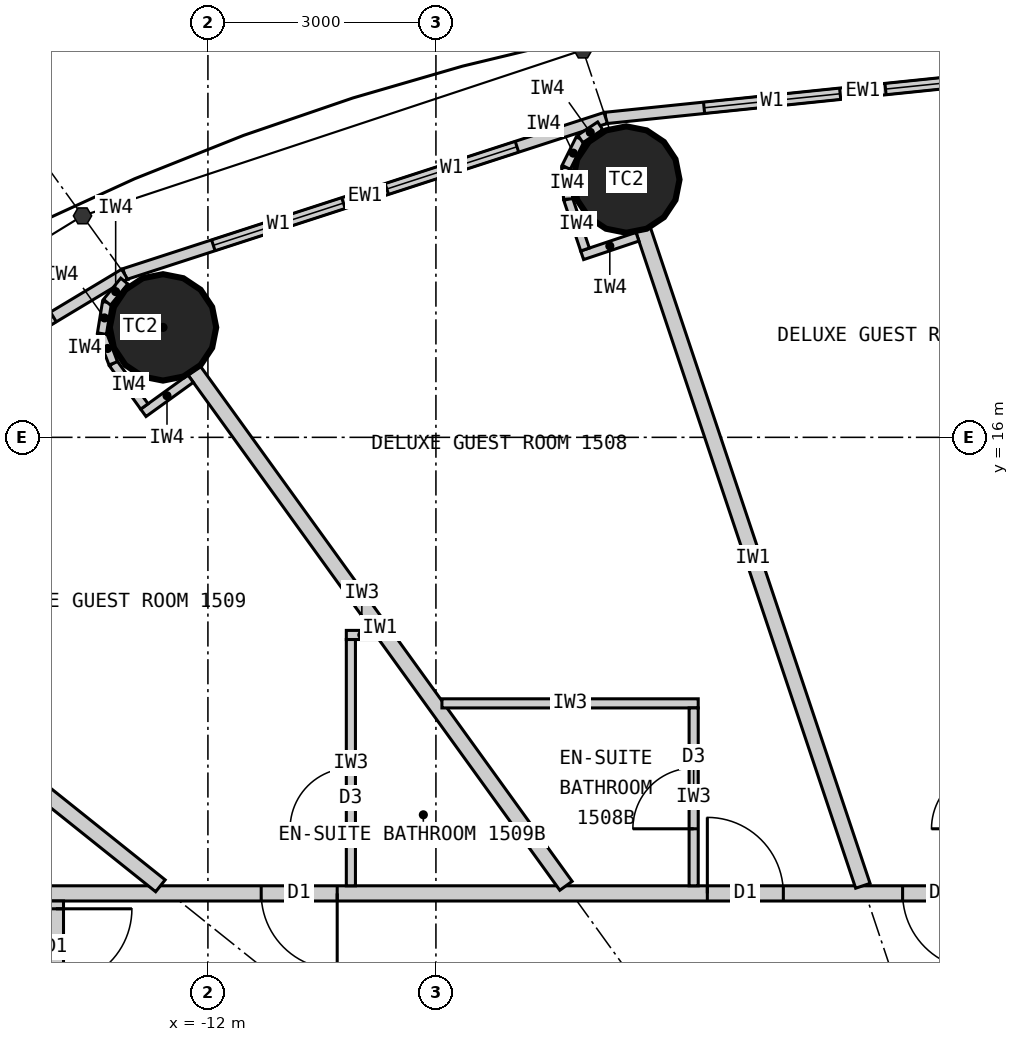
"""IFC4 building model, lengths in metres.
Left out: names, types, materials, properties, quantities, classifications, styles, units other than length and angle.
Written with IfcOpenShell. Run it as: python <this file> out.ifc"""

import sys

from ifc_helpers import new_model, si_unit, direction, frame, frame_2d, origin, origin_2d, place, context, subcontext, project, spatial, rectangle, circle, extrude, element, fill, save


model = new_model("IFC4")
c1 = context("Model", 3, precision=1e-05, world=origin(), true_north=direction((0.0, 1.0)))
c2 = subcontext(c1, "Body", "Model", "MODEL_VIEW")
j1 = project(units=[si_unit("LENGTHUNIT", "METRE"), si_unit("PLANEANGLEUNIT", "RADIAN")], contexts=[c1])
p1 = place(None, origin())
s1 = spatial("IfcSite", under=j1, at=p1, CompositionType="ELEMENT")
p2 = place(p1, origin())
s2 = spatial("IfcBuilding", under=s1, at=p2, CompositionType="ELEMENT")
p3 = place(p2, frame((0.0, 0.0, 63.9)))
s3 = spatial("IfcBuildingStorey", under=s2, at=p3, CompositionType="ELEMENT", Elevation=63.9)
for number, where, z_axis, x_axis in (
    (1, (-6.495, 19.391, 0.0), (0.0, 0.0, 1.0), (1.0, 0.0, 0.0)),
    (2, (-12.591, 17.447, 0.0), (0.0, 0.0, 1.0), (1.0, 0.0, 0.0)),
):
    element("IfcColumn", number, at=place(p3, frame(where, z_axis=z_axis, x_axis=x_axis)), inside=s3, PredefinedType="COLUMN", context=c2, shape_type="SweptSolid", body=[
        extrude(circle(Radius=0.7, at=origin_2d()), origin(), (0.0, 0.0, 1.0), 3.3),
    ])
p4 = place(p3, frame((0.0, 20.9, 0.0), z_axis=(0.0, 0.0, 1.0), x_axis=(-0.994721394369, -0.102612609291, 0.0)))
e3 = element("IfcWall", 3, at=p4, inside=s3, PredefinedType="ELEMENTEDWALL", context=c2, shape_type="SweptSolid", body=[
    extrude(rectangle(XDim=6.802, YDim=0.15, at=frame_2d((3.401, 0.0))), origin(), (0.0, 0.0, 1.0), 3.12),
])
p5 = place(p4, frame((1.301, 0.0, 0.9)))
e4 = element("IfcOpeningElement", 4, at=p5, cuts=e3, PredefinedType="OPENING", context=c2, shape_type="SweptSolid", body=[
    extrude(rectangle(XDim=1.8, YDim=1.9, at=frame_2d((0.9, 0.95))), frame((0.0, 0.085, 0.0), z_axis=(0.0, -1.0, 0.0), x_axis=(1.0, 0.0, 0.0)), (0.0, 0.0, 1.0), 0.17),
])
p6 = place(p4, frame((3.701, 0.0, 0.9)))
e5 = element("IfcOpeningElement", 5, at=p6, cuts=e3, PredefinedType="OPENING", context=c2, shape_type="SweptSolid", body=[
    extrude(rectangle(XDim=1.8, YDim=1.9, at=frame_2d((0.9, 0.95))), frame((0.0, 0.085, 0.0), z_axis=(0.0, -1.0, 0.0), x_axis=(1.0, 0.0, 0.0)), (0.0, 0.0, 1.0), 0.17),
])
p7 = place(p3, frame((-6.766, 20.202, 0.0), z_axis=(0.0, 0.0, 1.0), x_axis=(-0.951137534625, -0.308767534285, 0.0)))
e6 = element("IfcWall", 6, at=p7, inside=s3, PredefinedType="ELEMENTEDWALL", context=c2, shape_type="SweptSolid", body=[
    extrude(rectangle(XDim=6.655, YDim=0.15, at=frame_2d((3.328, 0.0))), origin(), (0.0, 0.0, 1.0), 3.12),
])
p8 = place(p7, frame((1.228, 0.0, 0.9)))
e7 = element("IfcOpeningElement", 7, at=p8, cuts=e6, PredefinedType="OPENING", context=c2, shape_type="SweptSolid", body=[
    extrude(rectangle(XDim=1.8, YDim=1.9, at=frame_2d((0.9, 0.95))), frame((0.0, 0.085, 0.0), z_axis=(0.0, -1.0, 0.0), x_axis=(1.0, 0.0, 0.0)), (0.0, 0.0, 1.0), 0.17),
])
p9 = place(p7, frame((3.628, 0.0, 0.9)))
e8 = element("IfcOpeningElement", 8, at=p9, cuts=e6, PredefinedType="OPENING", context=c2, shape_type="SweptSolid", body=[
    extrude(rectangle(XDim=1.8, YDim=1.9, at=frame_2d((0.9, 0.95))), frame((0.0, 0.085, 0.0), z_axis=(0.0, -1.0, 0.0), x_axis=(1.0, 0.0, 0.0)), (0.0, 0.0, 1.0), 0.17),
])
p10 = place(p3, frame((-13.096, 18.147, 0.0), z_axis=(0.0, 0.0, 1.0), x_axis=(-0.856983180864, -0.515344377787, 0.0)))
e9 = element("IfcWall", 9, at=p10, inside=s3, PredefinedType="ELEMENTEDWALL", context=c2, shape_type="SweptSolid", body=[
    extrude(rectangle(XDim=6.386, YDim=0.15, at=frame_2d((3.193, 0.0))), origin(), (0.0, 0.0, 1.0), 3.12),
])
p11 = place(p10, frame((1.093, 0.0, 0.9)))
e10 = element("IfcOpeningElement", 10, at=p11, cuts=e9, PredefinedType="OPENING", context=c2, shape_type="SweptSolid", body=[
    extrude(rectangle(XDim=1.8, YDim=1.9, at=frame_2d((0.9, 0.95))), frame((0.0, 0.085, 0.0), z_axis=(0.0, -1.0, 0.0), x_axis=(1.0, 0.0, 0.0)), (0.0, 0.0, 1.0), 0.17),
])
p12 = place(p10, frame((3.493, 0.0, 0.9)))
e11 = element("IfcOpeningElement", 11, at=p12, cuts=e9, PredefinedType="OPENING", context=c2, shape_type="SweptSolid", body=[
    extrude(rectangle(XDim=1.8, YDim=1.9, at=frame_2d((0.9, 0.95))), frame((0.0, 0.085, 0.0), z_axis=(0.0, -1.0, 0.0), x_axis=(1.0, 0.0, 0.0)), (0.0, 0.0, 1.0), 0.17),
])
p13 = place(p3, frame((-14.1, 10.0, 0.0), z_axis=(0.0, 0.0, 1.0), x_axis=(1.0, 0.0, 0.0)))
e12 = element("IfcWall", 12, at=p13, inside=s3, PredefinedType="PARTITIONING", context=c2, shape_type="SweptSolid", body=[
    extrude(rectangle(XDim=28.2, YDim=0.2, at=frame_2d((14.1, 0.0))), origin(), (0.0, 0.0, 1.0), 3.12),
])
p14 = place(p13, frame((18.529, 0.0, 0.0)))
e13 = element("IfcOpeningElement", 13, at=p14, cuts=e12, PredefinedType="OPENING", context=c2, shape_type="SweptSolid", body=[
    extrude(rectangle(XDim=1.0, YDim=2.2, at=frame_2d((0.5, 1.1))), frame((0.0, 0.11, 0.0), z_axis=(0.0, -1.0, 0.0), x_axis=(1.0, 0.0, 0.0)), (0.0, 0.0, 1.0), 0.22),
])
p15 = place(p13, frame((14.623, 0.0, 0.0)))
e14 = element("IfcOpeningElement", 14, at=p15, cuts=e12, PredefinedType="OPENING", context=c2, shape_type="SweptSolid", body=[
    extrude(rectangle(XDim=1.0, YDim=2.2, at=frame_2d((0.5, 1.1))), frame((0.0, 0.11, 0.0), z_axis=(0.0, -1.0, 0.0), x_axis=(1.0, 0.0, 0.0)), (0.0, 0.0, 1.0), 0.22),
])
p16 = place(p13, frame((11.24, 0.0, 0.0)))
e15 = element("IfcOpeningElement", 15, at=p16, cuts=e12, PredefinedType="OPENING", context=c2, shape_type="SweptSolid", body=[
    extrude(rectangle(XDim=1.0, YDim=2.2, at=frame_2d((0.5, 1.1))), frame((0.0, 0.11, 0.0), z_axis=(0.0, -1.0, 0.0), x_axis=(1.0, 0.0, 0.0)), (0.0, 0.0, 1.0), 0.22),
])
p17 = place(p13, frame((8.671, 0.0, 0.0)))
e16 = element("IfcOpeningElement", 16, at=p17, cuts=e12, PredefinedType="OPENING", context=c2, shape_type="SweptSolid", body=[
    extrude(rectangle(XDim=1.0, YDim=2.2, at=frame_2d((0.5, 1.1))), frame((0.0, 0.11, 0.0), z_axis=(0.0, -1.0, 0.0), x_axis=(1.0, 0.0, 0.0)), (0.0, 0.0, 1.0), 0.22),
])
p18 = place(p13, frame((2.801, 0.0, 0.0)))
e17 = element("IfcOpeningElement", 17, at=p18, cuts=e12, PredefinedType="OPENING", context=c2, shape_type="SweptSolid", body=[
    extrude(rectangle(XDim=1.0, YDim=2.2, at=frame_2d((0.5, 1.1))), frame((0.0, 0.11, 0.0), z_axis=(0.0, -1.0, 0.0), x_axis=(1.0, 0.0, 0.0)), (0.0, 0.0, 1.0), 0.22),
])
p19 = place(p3, frame((-14.0, 9.9, 0.0), z_axis=(0.0, 0.0, 1.0), x_axis=(0.0, -1.0, 0.0)))
e18 = element("IfcWall", 18, at=p19, inside=s3, PredefinedType="PARTITIONING", context=c2, shape_type="SweptSolid", body=[
    extrude(rectangle(XDim=19.8, YDim=0.2, at=frame_2d((9.9, 0.0))), origin(), (0.0, 0.0, 1.0), 3.12),
])
p20 = place(p19, frame((0.103, 0.0, 0.0)))
e19 = element("IfcOpeningElement", 19, at=p20, cuts=e18, PredefinedType="OPENING", context=c2, shape_type="SweptSolid", body=[
    extrude(rectangle(XDim=1.0, YDim=2.2, at=frame_2d((0.5, 1.1))), frame((0.0, 0.11, 0.0), z_axis=(0.0, -1.0, 0.0), x_axis=(1.0, 0.0, 0.0)), (0.0, 0.0, 1.0), 0.22),
])
p21 = place(p19, frame((5.248, 0.0, 0.0)))
e20 = element("IfcOpeningElement", 20, at=p21, cuts=e18, PredefinedType="OPENING", context=c2, shape_type="SweptSolid", body=[
    extrude(rectangle(XDim=1.0, YDim=2.2, at=frame_2d((0.5, 1.1))), frame((0.0, 0.11, 0.0), z_axis=(0.0, -1.0, 0.0), x_axis=(1.0, 0.0, 0.0)), (0.0, 0.0, 1.0), 0.22),
])
p22 = place(p19, frame((9.438, 0.0, 0.0)))
e21 = element("IfcOpeningElement", 21, at=p22, cuts=e18, PredefinedType="OPENING", context=c2, shape_type="SweptSolid", body=[
    extrude(rectangle(XDim=1.0, YDim=2.2, at=frame_2d((0.5, 1.1))), frame((0.0, 0.11, 0.0), z_axis=(0.0, -1.0, 0.0), x_axis=(1.0, 0.0, 0.0)), (0.0, 0.0, 1.0), 0.22),
])
p23 = place(p19, frame((13.942, 0.0, 0.0)))
e22 = element("IfcOpeningElement", 22, at=p23, cuts=e18, PredefinedType="OPENING", context=c2, shape_type="SweptSolid", body=[
    extrude(rectangle(XDim=1.0, YDim=2.2, at=frame_2d((0.5, 1.1))), frame((0.0, 0.11, 0.0), z_axis=(0.0, -1.0, 0.0), x_axis=(1.0, 0.0, 0.0)), (0.0, 0.0, 1.0), 0.22),
])
p24 = place(p19, frame((18.698, 0.0, 0.0)))
e23 = element("IfcOpeningElement", 23, at=p24, cuts=e18, PredefinedType="OPENING", context=c2, shape_type="SweptSolid", body=[
    extrude(rectangle(XDim=1.0, YDim=2.2, at=frame_2d((0.5, 1.1))), frame((0.0, 0.11, 0.0), z_axis=(0.0, -1.0, 0.0), x_axis=(1.0, 0.0, 0.0)), (0.0, 0.0, 1.0), 0.22),
])
p25 = place(p3, frame((-3.383, 10.1, 0.0), z_axis=(0.0, 0.0, 1.0), x_axis=(-0.31759592231, 0.948226149256, 0.0)))
e24 = element("IfcWall", 24, at=p25, inside=s3, PredefinedType="PARTITIONING", context=c2, shape_type="SweptSolid", body=[
    extrude(rectangle(XDim=9.098, YDim=0.2, at=frame_2d((4.549, 0.0))), origin(), (0.0, 0.0, 1.0), 2.32),
])
p26 = place(p3, frame((-7.289, 10.1, 0.0), z_axis=(0.0, 0.0, 1.0), x_axis=(-0.585198353053, 0.810890182197, 0.0)))
e25 = element("IfcWall", 25, at=p26, inside=s3, PredefinedType="PARTITIONING", context=c2, shape_type="SweptSolid", body=[
    extrude(rectangle(XDim=8.36, YDim=0.2, at=frame_2d((4.18, 0.0))), origin(), (0.0, 0.0, 1.0), 2.32),
])
p27 = place(p3, frame((-12.625, 10.1, 0.0), z_axis=(0.0, 0.0, 1.0), x_axis=(-0.780892451574, 0.624665493744, 0.0)))
e26 = element("IfcWall", 26, at=p27, inside=s3, PredefinedType="PARTITIONING", context=c2, shape_type="SweptSolid", body=[
    extrude(rectangle(XDim=6.045, YDim=0.2, at=frame_2d((3.022, 0.0))), origin(), (0.0, 0.0, 1.0), 2.32),
])
p28 = place(p3, frame((-8.921, 12.5, 0.0), z_axis=(0.0, 0.0, 1.0), x_axis=(1.0, 0.0, 0.0)))
e27 = element("IfcWall", 27, at=p28, inside=s3, PredefinedType="PARTITIONING", context=c2, shape_type="SweptSolid", body=[
    extrude(rectangle(XDim=3.372, YDim=0.12, at=frame_2d((1.686, 0.0))), origin(), (0.0, 0.0, 1.0), 3.12),
])
p29 = place(p3, frame((-5.609, 10.1, 0.0), z_axis=(0.0, 0.0, 1.0), x_axis=(0.0, 1.0, 0.0)))
e28 = element("IfcWall", 28, at=p29, inside=s3, PredefinedType="PARTITIONING", context=c2, shape_type="SweptSolid", body=[
    extrude(rectangle(XDim=2.34, YDim=0.12, at=frame_2d((1.17, 0.0))), origin(), (0.0, 0.0, 1.0), 3.12),
])
p30 = place(p29, frame((0.75, 0.0, 0.0)))
e29 = element("IfcOpeningElement", 29, at=p30, cuts=e28, PredefinedType="OPENING", context=c2, shape_type="SweptSolid", body=[
    extrude(rectangle(XDim=0.8, YDim=2.1, at=frame_2d((0.4, 1.05))), frame((0.0, 0.07, 0.0), z_axis=(0.0, -1.0, 0.0), x_axis=(1.0, 0.0, 0.0)), (0.0, 0.0, 1.0), 0.14),
])
p31 = place(p3, frame((-9.771, 13.4, 0.0), z_axis=(0.0, 0.0, 1.0), x_axis=(-1.0, 0.0, 0.0)))
e30 = element("IfcWall", 30, at=p31, inside=s3, PredefinedType="PARTITIONING", context=c2, shape_type="SweptSolid", body=[
    extrude(rectangle(XDim=0.408, YDim=0.12, at=frame_2d((0.204, 0.0))), origin(), (0.0, 0.0, 1.0), 3.12),
])
p32 = place(p3, frame((-10.119, 10.1, 0.0), z_axis=(0.0, 0.0, 1.0), x_axis=(0.0, 1.0, 0.0)))
e31 = element("IfcWall", 31, at=p32, inside=s3, PredefinedType="PARTITIONING", context=c2, shape_type="SweptSolid", body=[
    extrude(rectangle(XDim=3.24, YDim=0.12, at=frame_2d((1.62, 0.0))), origin(), (0.0, 0.0, 1.0), 3.12),
])
p33 = place(p32, frame((0.75, 0.0, 0.0)))
e32 = element("IfcOpeningElement", 32, at=p33, cuts=e31, PredefinedType="OPENING", context=c2, shape_type="SweptSolid", body=[
    extrude(rectangle(XDim=0.8, YDim=2.1, at=frame_2d((0.4, 1.05))), frame((0.0, 0.07, 0.0), z_axis=(0.0, -1.0, 0.0), x_axis=(1.0, 0.0, 0.0)), (0.0, 0.0, 1.0), 0.14),
])
p34 = place(p3, frame((-6.348, 18.639, 0.0), z_axis=(0.0, 0.0, 1.0), x_axis=(-0.948268951266, -0.317468102437, 0.0)))
e33 = element("IfcWall", 33, at=p34, inside=s3, PredefinedType="PARTITIONING", context=c2, shape_type="SweptSolid", body=[
    extrude(rectangle(XDim=0.768, YDim=0.12, at=frame_2d((0.384, 0.0))), origin(), (0.0, 0.0, 1.0), 3.12),
])
p35 = place(p3, frame((-7.038, 18.471, 0.0), z_axis=(0.0, 0.0, 1.0), x_axis=(-0.317378466199, 0.9482989556, 0.0)))
e34 = element("IfcWall", 34, at=p35, inside=s3, PredefinedType="PARTITIONING", context=c2, shape_type="SweptSolid", body=[
    extrude(rectangle(XDim=0.7, YDim=0.12, at=frame_2d((0.35, 0.0))), origin(), (0.0, 0.0, 1.0), 3.12),
])
p36 = place(p3, frame((-7.26, 19.135, 0.0), z_axis=(0.0, 0.0, 1.0), x_axis=(-0.0613238046, 0.99811792439, 0.0)))
e35 = element("IfcWall", 35, at=p36, inside=s3, PredefinedType="PARTITIONING", context=c2, shape_type="SweptSolid", body=[
    extrude(rectangle(XDim=0.418, YDim=0.12, at=frame_2d((0.209, 0.0))), origin(), (0.0, 0.0, 1.0), 3.12),
])
p37 = place(p3, frame((-7.286, 19.552, 0.0), z_axis=(0.0, 0.0, 1.0), x_axis=(0.445810757773, 0.89512723579, 0.0)))
e36 = element("IfcWall", 36, at=p37, inside=s3, PredefinedType="PARTITIONING", context=c2, shape_type="SweptSolid", body=[
    extrude(rectangle(XDim=0.418, YDim=0.12, at=frame_2d((0.209, 0.0))), origin(), (0.0, 0.0, 1.0), 3.12),
])
p38 = place(p3, frame((-7.1, 19.926, 0.0), z_axis=(0.0, 0.0, 1.0), x_axis=(0.833488262509, 0.552537162787, 0.0)))
e37 = element("IfcWall", 37, at=p38, inside=s3, PredefinedType="PARTITIONING", context=c2, shape_type="SweptSolid", body=[
    extrude(rectangle(XDim=0.313, YDim=0.12, at=frame_2d((0.156, 0.0))), origin(), (0.0, 0.0, 1.0), 3.12),
])
p39 = place(p3, frame((-12.227, 16.772, 0.0), z_axis=(0.0, 0.0, 1.0), x_axis=(-0.810821798253, -0.585293098778, 0.0)))
e38 = element("IfcWall", 38, at=p39, inside=s3, PredefinedType="PARTITIONING", context=c2, shape_type="SweptSolid", body=[
    extrude(rectangle(XDim=0.768, YDim=0.12, at=frame_2d((0.384, 0.0))), origin(), (0.0, 0.0, 1.0), 3.12),
])
p40 = place(p3, frame((-12.836, 16.406, 0.0), z_axis=(0.0, 0.0, 1.0), x_axis=(-0.585223113993, 0.810872312296, 0.0)))
e39 = element("IfcWall", 39, at=p40, inside=s3, PredefinedType="PARTITIONING", context=c2, shape_type="SweptSolid", body=[
    extrude(rectangle(XDim=0.7, YDim=0.12, at=frame_2d((0.35, 0.0))), origin(), (0.0, 0.0, 1.0), 3.12),
])
p41 = place(p3, frame((-13.246, 16.974, 0.0), z_axis=(0.0, 0.0, 1.0), x_axis=(-0.355728122235, 0.934589483705, 0.0)))
e40 = element("IfcWall", 40, at=p41, inside=s3, PredefinedType="PARTITIONING", context=c2, shape_type="SweptSolid", body=[
    extrude(rectangle(XDim=0.418, YDim=0.12, at=frame_2d((0.209, 0.0))), origin(), (0.0, 0.0, 1.0), 3.12),
])
p42 = place(p3, frame((-13.394, 17.365, 0.0), z_axis=(0.0, 0.0, 1.0), x_axis=(0.159379276926, 0.987217425943, 0.0)))
e41 = element("IfcWall", 41, at=p42, inside=s3, PredefinedType="PARTITIONING", context=c2, shape_type="SweptSolid", body=[
    extrude(rectangle(XDim=0.418, YDim=0.12, at=frame_2d((0.209, 0.0))), origin(), (0.0, 0.0, 1.0), 3.12),
])
p43 = place(p3, frame((-13.328, 17.777, 0.0), z_axis=(0.0, 0.0, 1.0), x_axis=(0.632276783541, 0.774742582407, 0.0)))
e42 = element("IfcWall", 42, at=p43, inside=s3, PredefinedType="PARTITIONING", context=c2, shape_type="SweptSolid", body=[
    extrude(rectangle(XDim=0.36, YDim=0.12, at=frame_2d((0.18, 0.0))), origin(), (0.0, 0.0, 1.0), 3.12),
])
p44 = place(p5, origin())
e43 = element("IfcWindow", 43, at=p44, inside=s3, PartitioningType="SINGLE_PANEL", PredefinedType="WINDOW", context=c2, shape_type="SweptSolid", body=[
    extrude(rectangle(XDim=1.8, YDim=1.9, at=frame_2d((0.9, 0.95))), frame((0.0, 0.03, 0.0), z_axis=(0.0, -1.0, 0.0), x_axis=(1.0, 0.0, 0.0)), (0.0, 0.0, 1.0), 0.06),
])
fill(e4, e43)
p45 = place(p6, origin())
e44 = element("IfcWindow", 44, at=p45, inside=s3, PartitioningType="SINGLE_PANEL", PredefinedType="WINDOW", context=c2, shape_type="SweptSolid", body=[
    extrude(rectangle(XDim=1.8, YDim=1.9, at=frame_2d((0.9, 0.95))), frame((0.0, 0.03, 0.0), z_axis=(0.0, -1.0, 0.0), x_axis=(1.0, 0.0, 0.0)), (0.0, 0.0, 1.0), 0.06),
])
fill(e5, e44)
p46 = place(p8, origin())
e45 = element("IfcWindow", 45, at=p46, inside=s3, PartitioningType="SINGLE_PANEL", PredefinedType="WINDOW", context=c2, shape_type="SweptSolid", body=[
    extrude(rectangle(XDim=1.8, YDim=1.9, at=frame_2d((0.9, 0.95))), frame((0.0, 0.03, 0.0), z_axis=(0.0, -1.0, 0.0), x_axis=(1.0, 0.0, 0.0)), (0.0, 0.0, 1.0), 0.06),
])
fill(e7, e45)
p47 = place(p9, origin())
e46 = element("IfcWindow", 46, at=p47, inside=s3, PartitioningType="SINGLE_PANEL", PredefinedType="WINDOW", context=c2, shape_type="SweptSolid", body=[
    extrude(rectangle(XDim=1.8, YDim=1.9, at=frame_2d((0.9, 0.95))), frame((0.0, 0.03, 0.0), z_axis=(0.0, -1.0, 0.0), x_axis=(1.0, 0.0, 0.0)), (0.0, 0.0, 1.0), 0.06),
])
fill(e8, e46)
p48 = place(p11, origin())
e47 = element("IfcWindow", 47, at=p48, inside=s3, PartitioningType="SINGLE_PANEL", PredefinedType="WINDOW", context=c2, shape_type="SweptSolid", body=[
    extrude(rectangle(XDim=1.8, YDim=1.9, at=frame_2d((0.9, 0.95))), frame((0.0, 0.03, 0.0), z_axis=(0.0, -1.0, 0.0), x_axis=(1.0, 0.0, 0.0)), (0.0, 0.0, 1.0), 0.06),
])
fill(e10, e47)
p49 = place(p16, origin())
e48 = element("IfcDoor", 48, at=p49, inside=s3, OperationType="SINGLE_SWING_RIGHT", PredefinedType="DOOR", context=c2, shape_type="SweptSolid", body=[
    extrude(rectangle(XDim=1.0, YDim=2.2, at=frame_2d((0.5, 1.1))), frame((0.0, 0.025, 0.0), z_axis=(0.0, -1.0, 0.0), x_axis=(1.0, 0.0, 0.0)), (0.0, 0.0, 1.0), 0.05),
])
fill(e15, e48)
p50 = place(p30, origin())
e49 = element("IfcDoor", 49, at=p50, inside=s3, OperationType="SINGLE_SWING_LEFT", PredefinedType="DOOR", context=c2, shape_type="SweptSolid", body=[
    extrude(rectangle(XDim=0.8, YDim=2.1, at=frame_2d((0.4, 1.05))), frame((0.0, 0.025, 0.0), z_axis=(0.0, -1.0, 0.0), x_axis=(1.0, 0.0, 0.0)), (0.0, 0.0, 1.0), 0.05),
])
fill(e29, e49)
p51 = place(p17, origin())
e50 = element("IfcDoor", 50, at=p51, inside=s3, OperationType="SINGLE_SWING_LEFT", PredefinedType="DOOR", context=c2, shape_type="SweptSolid", body=[
    extrude(rectangle(XDim=1.0, YDim=2.2, at=frame_2d((0.5, 1.1))), frame((0.0, 0.025, 0.0), z_axis=(0.0, -1.0, 0.0), x_axis=(1.0, 0.0, 0.0)), (0.0, 0.0, 1.0), 0.05),
])
fill(e16, e50)
p52 = place(p33, origin())
e51 = element("IfcDoor", 51, at=p52, inside=s3, OperationType="SINGLE_SWING_LEFT", PredefinedType="DOOR", context=c2, shape_type="SweptSolid", body=[
    extrude(rectangle(XDim=0.8, YDim=2.1, at=frame_2d((0.4, 1.05))), frame((0.0, 0.025, 0.0), z_axis=(0.0, -1.0, 0.0), x_axis=(1.0, 0.0, 0.0)), (0.0, 0.0, 1.0), 0.05),
])
fill(e32, e51)
p53 = place(p18, origin())
e52 = element("IfcDoor", 52, at=p53, inside=s3, OperationType="SINGLE_SWING_RIGHT", PredefinedType="DOOR", context=c2, shape_type="SweptSolid", body=[
    extrude(rectangle(XDim=1.0, YDim=2.2, at=frame_2d((0.5, 1.1))), frame((0.0, 0.025, 0.0), z_axis=(0.0, -1.0, 0.0), x_axis=(1.0, 0.0, 0.0)), (0.0, 0.0, 1.0), 0.05),
])
fill(e17, e52)
p54 = place(p20, origin())
e53 = element("IfcDoor", 53, at=p54, inside=s3, OperationType="SINGLE_SWING_LEFT", PredefinedType="DOOR", context=c2, shape_type="SweptSolid", body=[
    extrude(rectangle(XDim=1.0, YDim=2.2, at=frame_2d((0.5, 1.1))), frame((0.0, 0.025, 0.0), z_axis=(0.0, -1.0, 0.0), x_axis=(1.0, 0.0, 0.0)), (0.0, 0.0, 1.0), 0.05),
])
fill(e19, e53)
save(model, sys.argv[1])
